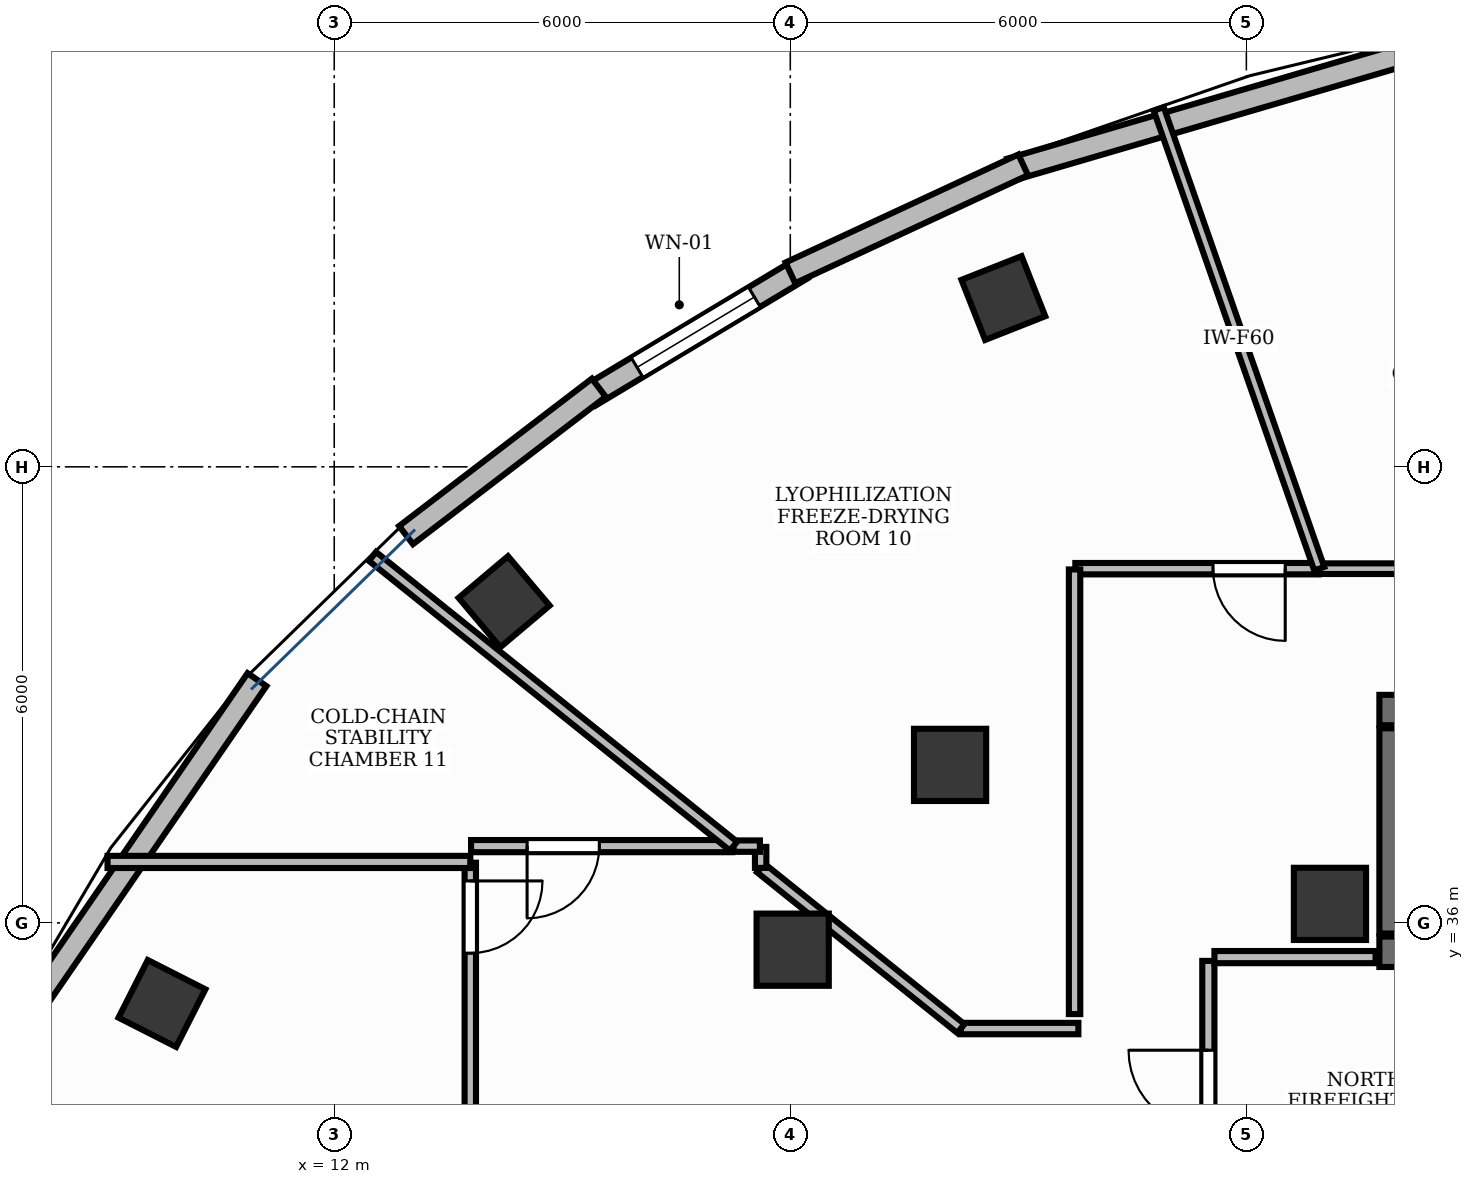
"""IFC4 building model, lengths in metres.
Left out: names, types, materials, properties, quantities, classifications, styles, units other than length and angle.
Written with IfcOpenShell. Run it as: python <this file> out.ifc"""

import sys

from ifc_helpers import new_model, si_unit, direction, frame, frame_2d, origin, origin_2d, place, context, subcontext, project, spatial, rectangle, extrude, element, fill, save


model = new_model("IFC4")
c1 = context("Model", 3, precision=1e-05, world=origin(), true_north=direction((0.0, 1.0)))
c2 = subcontext(c1, "Body", "Model", "MODEL_VIEW")
j1 = project(units=[si_unit("LENGTHUNIT", "METRE"), si_unit("PLANEANGLEUNIT", "RADIAN")], contexts=[c1])
p1 = place(None, origin())
s1 = spatial("IfcSite", under=j1, at=p1, CompositionType="ELEMENT")
p2 = place(p1, origin())
s2 = spatial("IfcBuilding", under=s1, at=p2, CompositionType="ELEMENT")
p3 = place(p2, frame((0.0, 0.0, 247.8)))
s3 = spatial("IfcBuildingStorey", under=s2, at=p3, CompositionType="ELEMENT", Elevation=247.8)
p4 = place(p3, frame((25.75, 38.8, 0.0), z_axis=(0.0, 0.0, 1.0), x_axis=(1.0, 0.0, 0.0)))
e1 = element("IfcWall", 1, at=p4, inside=s3, PredefinedType="SHEAR", context=c2, shape_type="SweptSolid", body=[
    extrude(rectangle(XDim=3.1, YDim=0.4, at=frame_2d((1.55, 0.0))), origin(), (0.0, 0.0, 1.0), 3.9),
])
p5 = place(p3, frame((25.75, 35.62, 0.0), z_axis=(0.0, 0.0, 1.0), x_axis=(1.0, 0.0, 0.0)))
e2 = element("IfcWall", 2, at=p5, inside=s3, PredefinedType="SHEAR", context=c2, shape_type="SweptSolid", body=[
    extrude(rectangle(XDim=3.1, YDim=0.4, at=frame_2d((1.55, 0.0))), origin(), (0.0, 0.0, 1.0), 3.9),
])
p6 = place(p5, frame((0.9, 0.0, 0.0)))
e3 = element("IfcOpeningElement", 3, at=p6, cuts=e2, PredefinedType="OPENING", context=c2, shape_type="SweptSolid", body=[
    extrude(rectangle(XDim=1.3, YDim=2.2, at=frame_2d((0.65, 1.1))), frame((0.0, 0.215, 0.0), z_axis=(0.0, -1.0, 0.0), x_axis=(1.0, 0.0, 0.0)), (0.0, 0.0, 1.0), 0.43),
])
p7 = place(p3, frame((25.95, 35.86, 0.0), z_axis=(0.0, 0.0, 1.0), x_axis=(0.0, 1.0, 0.0)))
e4 = element("IfcWall", 4, at=p7, inside=s3, PredefinedType="SHEAR", context=c2, shape_type="SweptSolid", body=[
    extrude(rectangle(XDim=2.7, YDim=0.4, at=frame_2d((1.35, 0.0))), origin(), (0.0, 0.0, 1.0), 3.9),
])
p8 = place(p3, frame((25.1, 36.25, -0.0), z_axis=(0.0, 0.0, 1.0), x_axis=(1.0, 0.0, 0.0)))
e5 = element("IfcColumn", 5, at=p8, inside=s3, PredefinedType="PILASTER", context=c2, shape_type="SweptSolid", body=[
    extrude(rectangle(XDim=0.95, YDim=0.95, at=origin_2d()), origin(), (0.0, 0.0, 1.0), 3.901),
])
for number, where, z_axis, x_axis in (
    (6, (20.803, 44.22, -0.0), (0.0, 0.0, 1.0), (0.93, 0.367, 0.0)),
    (7, (14.235, 40.225, -0.0), (0.0, 0.0, 1.0), (0.764, 0.645, 0.0)),
):
    element("IfcColumn", number, at=place(p3, frame(where, z_axis=z_axis, x_axis=x_axis)), inside=s3, PredefinedType="COLUMN", context=c2, shape_type="SweptSolid", body=[
        extrude(rectangle(XDim=0.85, YDim=0.85, at=origin_2d()), origin(), (0.0, 0.0, 1.0), 3.901),
    ])
p9 = place(p3, frame((20.102, 38.079, -0.0), z_axis=(0.0, 0.0, 1.0), x_axis=(1.0, 0.0, 0.0)))
e8 = element("IfcColumn", 8, at=p9, inside=s3, PredefinedType="COLUMN", context=c2, shape_type="SweptSolid", body=[
    extrude(rectangle(XDim=0.95, YDim=0.95, at=origin_2d()), origin(), (0.0, 0.0, 1.0), 3.901),
])
p10 = place(p3, frame((9.733, 34.94, -0.0), z_axis=(0.0, 0.0, 1.0), x_axis=(0.453057191132, 0.891481453292, 0.0)))
e9 = element("IfcColumn", 9, at=p10, inside=s3, PredefinedType="COLUMN", context=c2, shape_type="SweptSolid", body=[
    extrude(rectangle(XDim=0.85, YDim=0.85, at=origin_2d()), origin(), (0.0, 0.0, 1.0), 3.901),
])
p11 = place(p3, frame((18.031, 35.647, -0.0), z_axis=(0.0, 0.0, 1.0), x_axis=(1.0, 0.0, 0.0)))
e10 = element("IfcColumn", 10, at=p11, inside=s3, PredefinedType="COLUMN", context=c2, shape_type="SweptSolid", body=[
    extrude(rectangle(XDim=0.95, YDim=0.95, at=origin_2d()), origin(), (0.0, 0.0, 1.0), 3.901),
])
p12 = place(p3, frame((18.148, 44.606, 0.0), z_axis=(0.0, 0.0, 1.0), x_axis=(-0.857526080841, -0.514440492844, 0.0)))
e11 = element("IfcWall", 11, at=p12, inside=s3, PredefinedType="STANDARD", context=c2, shape_type="SweptSolid", body=[
    extrude(rectangle(XDim=3.249, YDim=0.3, at=frame_2d((1.624, 0.0))), origin(), (0.0, 0.0, 1.0), 3.9),
])
p13 = place(p12, frame((0.724, 0.0, 0.9)))
e12 = element("IfcOpeningElement", 12, at=p13, cuts=e11, PredefinedType="OPENING", context=c2, shape_type="SweptSolid", body=[
    extrude(rectangle(XDim=1.8, YDim=2.1, at=frame_2d((0.9, 1.05))), frame((0.0, 0.165, 0.0), z_axis=(0.0, -1.0, 0.0), x_axis=(1.0, 0.0, 0.0)), (0.0, 0.0, 1.0), 0.33),
])
p14 = place(p3, frame((27.418, 47.82, 0.0), z_axis=(0.0, 0.0, 1.0), x_axis=(-0.959675502853, -0.281110172749, 0.0)))
e13 = element("IfcWall", 13, at=p14, inside=s3, PredefinedType="STANDARD", context=c2, shape_type="SweptSolid", body=[
    extrude(rectangle(XDim=6.797, YDim=0.3, at=frame_2d((3.398, 0.0))), origin(), (0.0, 0.0, 1.0), 3.9),
])
p15 = place(p3, frame((21.064, 45.973, 0.0), z_axis=(0.0, 0.0, 1.0), x_axis=(-0.907117430559, -0.420877615438, 0.0)))
e14 = element("IfcWall", 14, at=p15, inside=s3, PredefinedType="STANDARD", context=c2, shape_type="SweptSolid", body=[
    extrude(rectangle(XDim=3.377, YDim=0.3, at=frame_2d((1.688, 0.0))), origin(), (0.0, 0.0, 1.0), 3.9),
])
p16 = place(p3, frame((15.481, 43.041, 0.0), z_axis=(0.0, 0.0, 1.0), x_axis=(-0.794422949099, -0.60736494626, 0.0)))
e15 = element("IfcWall", 15, at=p16, inside=s3, PredefinedType="STANDARD", context=c2, shape_type="SweptSolid", body=[
    extrude(rectangle(XDim=3.192, YDim=0.3, at=frame_2d((1.596, 0.0))), origin(), (0.0, 0.0, 1.0), 3.9),
])
p17 = place(p3, frame((10.984, 39.2, 0.0), z_axis=(0.0, 0.0, 1.0), x_axis=(-0.566669772846, -0.823945003349, 0.0)))
e16 = element("IfcWall", 16, at=p17, inside=s3, PredefinedType="STANDARD", context=c2, shape_type="SweptSolid", body=[
    extrude(rectangle(XDim=5.734, YDim=0.3, at=frame_2d((2.867, 0.0))), origin(), (0.0, 0.0, 1.0), 3.47),
])
p18 = place(p3, frame((23.5, 32.1, 0.0), z_axis=(0.0, 0.0, 1.0), x_axis=(0.0, 1.0, 0.0)))
e17 = element("IfcWall", 17, at=p18, inside=s3, PredefinedType="PARTITIONING", context=c2, shape_type="SweptSolid", body=[
    extrude(rectangle(XDim=3.4, YDim=0.16, at=frame_2d((1.7, 0.0))), origin(), (0.0, 0.0, 1.0), 2.91),
])
p19 = place(p18, frame((1.175, 0.0, 0.0)))
e18 = element("IfcOpeningElement", 18, at=p19, cuts=e17, PredefinedType="OPENING", context=c2, shape_type="SweptSolid", body=[
    extrude(rectangle(XDim=1.05, YDim=2.15, at=frame_2d((0.525, 1.075))), frame((0.0, 0.095, 0.0), z_axis=(0.0, -1.0, 0.0), x_axis=(1.0, 0.0, 0.0)), (0.0, 0.0, 1.0), 0.19),
])
p20 = place(p3, frame((23.58, 35.55, 0.0), z_axis=(0.0, 0.0, 1.0), x_axis=(1.0, 0.0, 0.0)))
e19 = element("IfcWall", 19, at=p20, inside=s3, PredefinedType="PARTITIONING", context=c2, shape_type="SweptSolid", body=[
    extrude(rectangle(XDim=2.12, YDim=0.16, at=frame_2d((1.06, 0.0))), origin(), (0.0, 0.0, 1.0), 2.91),
])
p21 = place(p3, frame((31.267, 40.66, 0.0), z_axis=(0.0, 0.0, 1.0), x_axis=(-1.0, 0.0, 0.0)))
e20 = element("IfcWall", 20, at=p21, inside=s3, PredefinedType="PARTITIONING", context=c2, shape_type="SweptSolid", body=[
    extrude(rectangle(XDim=6.308, YDim=0.14, at=frame_2d((3.154, 0.0))), origin(), (0.0, 0.0, 1.0), 2.91),
])
p22 = place(p21, frame((0.24, 0.0, 0.0)))
e21 = element("IfcOpeningElement", 21, at=p22, cuts=e20, PredefinedType="OPENING", context=c2, shape_type="SweptSolid", body=[
    extrude(rectangle(XDim=0.95, YDim=2.15, at=frame_2d((0.475, 1.075))), frame((0.0, 0.085, 0.0), z_axis=(0.0, -1.0, 0.0), x_axis=(1.0, 0.0, 0.0)), (0.0, 0.0, 1.0), 0.17),
])
p23 = place(p3, frame((24.948, 40.66, 0.0), z_axis=(0.0, 0.0, 1.0), x_axis=(-1.0, 0.0, 0.0)))
e22 = element("IfcWall", 22, at=p23, inside=s3, PredefinedType="PARTITIONING", context=c2, shape_type="SweptSolid", body=[
    extrude(rectangle(XDim=3.198, YDim=0.15, at=frame_2d((1.599, 0.0))), origin(), (0.0, 0.0, 1.0), 2.91),
])
p24 = place(p23, frame((0.437, 0.0, 0.0)))
e23 = element("IfcOpeningElement", 23, at=p24, cuts=e22, PredefinedType="OPENING", context=c2, shape_type="SweptSolid", body=[
    extrude(rectangle(XDim=0.95, YDim=2.15, at=frame_2d((0.475, 1.075))), frame((0.0, 0.09, 0.0), z_axis=(0.0, -1.0, 0.0), x_axis=(1.0, 0.0, 0.0)), (0.0, 0.0, 1.0), 0.18),
])
p25 = place(p3, frame((17.237, 37.01, 0.0), z_axis=(0.0, 0.0, 1.0), x_axis=(-1.0, 0.0, 0.0)))
e24 = element("IfcWall", 24, at=p25, inside=s3, PredefinedType="PARTITIONING", context=c2, shape_type="SweptSolid", body=[
    extrude(rectangle(XDim=3.437, YDim=0.16, at=frame_2d((1.718, 0.0))), origin(), (0.0, 0.0, 1.0), 2.91),
])
p26 = place(p25, frame((1.75, 0.0, 0.0)))
e25 = element("IfcOpeningElement", 25, at=p26, cuts=e24, PredefinedType="OPENING", context=c2, shape_type="SweptSolid", body=[
    extrude(rectangle(XDim=0.95, YDim=2.15, at=frame_2d((0.475, 1.075))), frame((0.0, 0.095, 0.0), z_axis=(0.0, -1.0, 0.0), x_axis=(1.0, 0.0, 0.0)), (0.0, 0.0, 1.0), 0.19),
])
p27 = place(p3, frame((13.79, 36.792, 0.0), z_axis=(0.0, 0.0, 1.0), x_axis=(0.0, -1.0, 0.0)))
e26 = element("IfcWall", 26, at=p27, inside=s3, PredefinedType="PARTITIONING", context=c2, shape_type="SweptSolid", body=[
    extrude(rectangle(XDim=4.582, YDim=0.15, at=frame_2d((2.291, 0.0))), origin(), (0.0, 0.0, 1.0), 2.91),
])
p28 = place(p27, frame((0.24, 0.0, 0.0)))
e27 = element("IfcOpeningElement", 27, at=p28, cuts=e26, PredefinedType="OPENING", context=c2, shape_type="SweptSolid", body=[
    extrude(rectangle(XDim=0.95, YDim=2.15, at=frame_2d((0.475, 1.075))), frame((0.0, 0.09, 0.0), z_axis=(0.0, -1.0, 0.0), x_axis=(1.0, 0.0, 0.0)), (0.0, 0.0, 1.0), 0.18),
])
p29 = place(p3, frame((24.959, 40.66, 0.0), z_axis=(0.0, 0.0, 1.0), x_axis=(-0.329537269445, 0.944142567649, 0.0)))
e28 = element("IfcWall", 28, at=p29, inside=s3, PredefinedType="PARTITIONING", context=c2, shape_type="SweptSolid", body=[
    extrude(rectangle(XDim=6.407, YDim=0.14, at=frame_2d((3.204, 0.0))), origin(), (0.0, 0.0, 1.0), 2.91),
])
p30 = place(p3, frame((21.74, 40.65, 0.0), z_axis=(0.0, 0.0, 1.0), x_axis=(0.0, -1.0, 0.0)))
e29 = element("IfcWall", 29, at=p30, inside=s3, PredefinedType="PARTITIONING", context=c2, shape_type="SweptSolid", body=[
    extrude(rectangle(XDim=5.85, YDim=0.15, at=frame_2d((2.925, 0.0))), origin(), (0.0, 0.0, 1.0), 2.91),
])
p31 = place(p3, frame((21.79, 34.61, 0.0), z_axis=(0.0, 0.0, 1.0), x_axis=(-1.0, 0.0, 0.0)))
e30 = element("IfcWall", 30, at=p31, inside=s3, PredefinedType="PARTITIONING", context=c2, shape_type="SweptSolid", body=[
    extrude(rectangle(XDim=1.546, YDim=0.15, at=frame_2d((0.773, 0.0))), origin(), (0.0, 0.0, 1.0), 2.91),
])
p32 = place(p3, frame((20.244, 34.61, 0.0), z_axis=(0.0, 0.0, 1.0), x_axis=(-0.779965134007, 0.625822969963, 0.0)))
e31 = element("IfcWall", 31, at=p32, inside=s3, PredefinedType="PARTITIONING", context=c2, shape_type="SweptSolid", body=[
    extrude(rectangle(XDim=3.377, YDim=0.15, at=frame_2d((1.688, 0.0))), origin(), (0.0, 0.0, 1.0), 2.91),
])
p33 = place(p3, frame((17.61, 36.723, 0.0), z_axis=(0.0, 0.0, 1.0), x_axis=(0.0, 1.0, 0.0)))
e32 = element("IfcWall", 32, at=p33, inside=s3, PredefinedType="PARTITIONING", context=c2, shape_type="SweptSolid", body=[
    extrude(rectangle(XDim=0.277, YDim=0.15, at=frame_2d((0.138, 0.0))), origin(), (0.0, 0.0, 1.0), 2.91),
])
p34 = place(p3, frame((17.6, 37.01, 0.0), z_axis=(0.0, 0.0, 1.0), x_axis=(-1.0, 0.0, 0.0)))
e33 = element("IfcWall", 33, at=p34, inside=s3, PredefinedType="PARTITIONING", context=c2, shape_type="SweptSolid", body=[
    extrude(rectangle(XDim=0.347, YDim=0.15, at=frame_2d((0.174, 0.0))), origin(), (0.0, 0.0, 1.0), 2.91),
])
p35 = place(p3, frame((17.253, 37.01, 0.0), z_axis=(0.0, 0.0, 1.0), x_axis=(-0.779948830135, 0.625843288987, 0.0)))
e34 = element("IfcWall", 34, at=p35, inside=s3, PredefinedType="PARTITIONING", context=c2, shape_type="SweptSolid", body=[
    extrude(rectangle(XDim=6.09, YDim=0.15, at=frame_2d((3.045, 0.0))), origin(), (0.0, 0.0, 1.0), 2.91),
])
p36 = place(p3, frame((13.79, 36.802, 0.0), z_axis=(0.0, 0.0, 1.0), x_axis=(-1.0, 0.0, 0.0)))
e35 = element("IfcWall", 35, at=p36, inside=s3, PredefinedType="PARTITIONING", context=c2, shape_type="SweptSolid", body=[
    extrude(rectangle(XDim=4.772, YDim=0.16, at=frame_2d((2.386, 0.0))), origin(), (0.0, 0.0, 1.0), 2.91),
])
p37 = place(p13, origin())
e36 = element("IfcWindow", 36, at=p37, inside=s3, PartitioningType="SINGLE_PANEL", PredefinedType="WINDOW", context=c2, shape_type="SweptSolid", body=[
    extrude(rectangle(XDim=1.8, YDim=2.1, at=frame_2d((0.9, 1.05))), frame((0.0, 0.03, 0.0), z_axis=(0.0, -1.0, 0.0), x_axis=(1.0, 0.0, 0.0)), (0.0, 0.0, 1.0), 0.06),
])
fill(e12, e36)
p38 = place(p19, origin())
e37 = element("IfcDoor", 37, at=p38, inside=s3, OperationType="SINGLE_SWING_RIGHT", PredefinedType="DOOR", context=c2, shape_type="SweptSolid", body=[
    extrude(rectangle(XDim=1.05, YDim=2.15, at=frame_2d((0.525, 1.075))), frame((0.0, 0.025, 0.0), z_axis=(0.0, -1.0, 0.0), x_axis=(1.0, 0.0, 0.0)), (0.0, 0.0, 1.0), 0.05),
])
fill(e18, e37)
p39 = place(p24, origin())
e38 = element("IfcDoor", 38, at=p39, inside=s3, OperationType="SINGLE_SWING_LEFT", PredefinedType="DOOR", context=c2, shape_type="SweptSolid", body=[
    extrude(rectangle(XDim=0.95, YDim=2.15, at=frame_2d((0.475, 1.075))), frame((0.0, 0.025, 0.0), z_axis=(0.0, -1.0, 0.0), x_axis=(1.0, 0.0, 0.0)), (0.0, 0.0, 1.0), 0.05),
])
fill(e23, e38)
p40 = place(p26, origin())
e39 = element("IfcDoor", 39, at=p40, inside=s3, OperationType="SINGLE_SWING_RIGHT", PredefinedType="DOOR", context=c2, shape_type="SweptSolid", body=[
    extrude(rectangle(XDim=0.95, YDim=2.15, at=frame_2d((0.475, 1.075))), frame((0.0, 0.025, 0.0), z_axis=(0.0, -1.0, 0.0), x_axis=(1.0, 0.0, 0.0)), (0.0, 0.0, 1.0), 0.05),
])
fill(e25, e39)
p41 = place(p28, origin())
e40 = element("IfcDoor", 40, at=p41, inside=s3, OperationType="SINGLE_SWING_LEFT", PredefinedType="DOOR", context=c2, shape_type="SweptSolid", body=[
    extrude(rectangle(XDim=0.95, YDim=2.15, at=frame_2d((0.475, 1.075))), frame((0.0, 0.025, 0.0), z_axis=(0.0, -1.0, 0.0), x_axis=(1.0, 0.0, 0.0)), (0.0, 0.0, 1.0), 0.05),
])
fill(e27, e40)
save(model, sys.argv[1])
